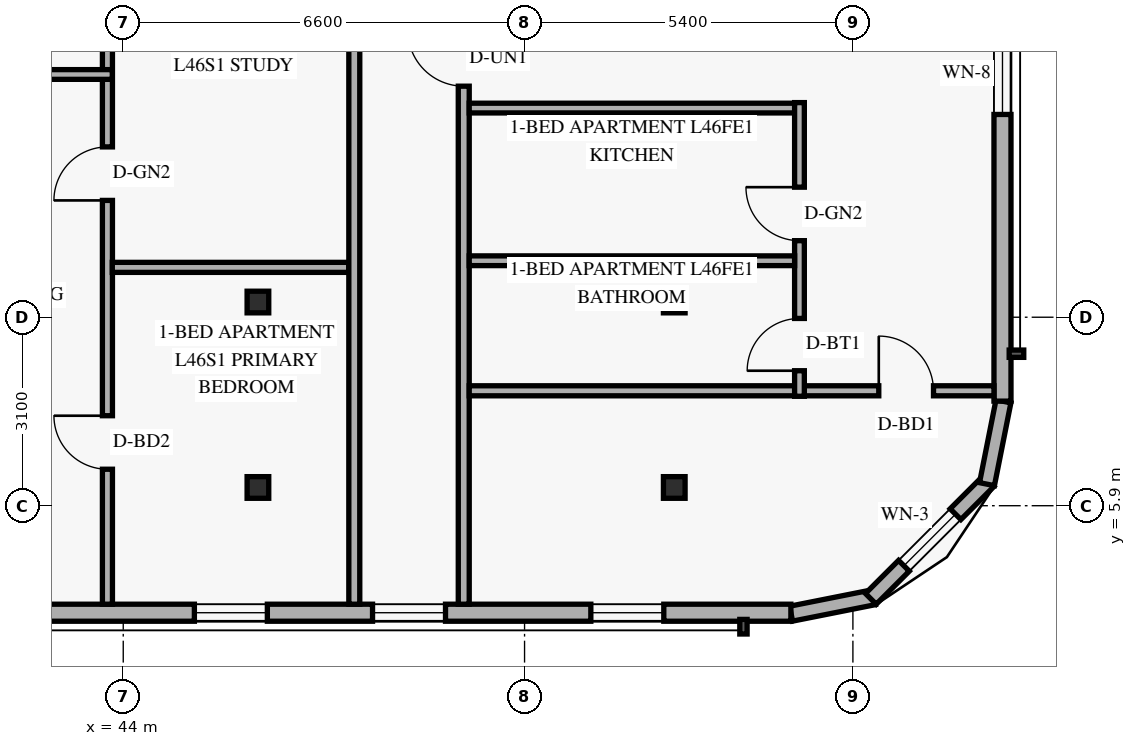
"""IFC4 building model, lengths in metres.
Left out: names, types, materials, properties, quantities, classifications, styles, units other than length and angle.
Written with IfcOpenShell. Run it as: python <this file> out.ifc"""

import sys

from ifc_helpers import new_model, si_unit, direction, frame, frame_2d, origin, origin_2d, place, context, subcontext, project, spatial, rectangle, hollow_rectangle, extrude, element, fill, save


model = new_model("IFC4")
c1 = context("Model", 3, precision=1e-05, world=origin(), true_north=direction((0.0, 1.0)))
c2 = subcontext(c1, "Body", "Model", "MODEL_VIEW")
j1 = project(units=[si_unit("LENGTHUNIT", "METRE"), si_unit("PLANEANGLEUNIT", "RADIAN")], contexts=[c1])
p1 = place(None, origin())
s1 = spatial("IfcSite", under=j1, at=p1, CompositionType="ELEMENT")
p2 = place(p1, origin())
s2 = spatial("IfcBuilding", under=s1, at=p2, CompositionType="ELEMENT")
p3 = place(p2, frame((0.0, 0.0, 177.6)))
s3 = spatial("IfcBuildingStorey", under=s2, at=p3, CompositionType="ELEMENT", Elevation=177.6)
for number, where, z_axis, x_axis in (
    (1, (46.152, 6.2, 0.0), (0.035, 0.0, 0.999), (0.0, 1.0, 0.0)),
    (2, (46.152, 9.25, 0.0), (0.035, 0.0, 0.999), (0.0, 1.0, 0.0)),
):
    element("IfcColumn", number, at=place(p3, frame(where, z_axis=z_axis, x_axis=x_axis)), inside=s3, PredefinedType="COLUMN", context=c2, shape_type="SweptSolid", body=[
        extrude(hollow_rectangle(XDim=0.356, YDim=0.356, WallThickness=0.016, at=origin_2d()), origin(), (0.0, 0.0, 1.0), 3.602),
    ])
for number, where, z_axis, x_axis in (
    (3, (52.958, 6.2, 0.0), (0.058, 0.0, 0.998), (0.0, 1.0, 0.0)),
    (4, (52.958, 9.25, 0.0), (0.058, 0.0, 0.998), (0.0, 1.0, 0.0)),
):
    element("IfcColumn", number, at=place(p3, frame(where, z_axis=z_axis, x_axis=x_axis)), inside=s3, PredefinedType="COLUMN", context=c2, shape_type="SweptSolid", body=[
        extrude(hollow_rectangle(XDim=0.356, YDim=0.356, WallThickness=0.016, at=origin_2d()), origin(), (0.0, 0.0, 1.0), 3.606),
    ])
p4 = place(p3, frame((54.983, 4.124, 0.0), z_axis=(0.0, 0.0, 1.0), x_axis=(0.980809899341, 0.19496651342, 0.0)))
e5 = element("IfcWall", 5, at=p4, inside=s3, PredefinedType="SOLIDWALL", context=c2, shape_type="SweptSolid", body=[
    extrude(rectangle(XDim=1.389, YDim=0.25, at=frame_2d((0.694, 0.0))), origin(), (0.0, 0.0, 1.0), 3.36),
])
p5 = place(p3, frame((56.295, 4.368, 0.0), z_axis=(0.0, 0.0, 1.0), x_axis=(0.707106781187, 0.707106781187, 0.0)))
e6 = element("IfcWall", 6, at=p5, inside=s3, PredefinedType="SOLIDWALL", context=c2, shape_type="SweptSolid", body=[
    extrude(rectangle(XDim=2.739, YDim=0.25, at=frame_2d((1.37, 0.0))), origin(), (0.0, 0.0, 1.0), 3.36),
])
p6 = place(p5, frame((0.77, 0.0, 0.85)))
e7 = element("IfcOpeningElement", 7, at=p6, cuts=e6, PredefinedType="OPENING", context=c2, shape_type="SweptSolid", body=[
    extrude(rectangle(XDim=1.2, YDim=1.5, at=frame_2d((0.6, 0.75))), frame((0.0, 0.135, 0.0), z_axis=(0.0, -1.0, 0.0), x_axis=(1.0, 0.0, 0.0)), (0.0, 0.0, 1.0), 0.27),
])
p7 = place(p3, frame((58.205, 6.254, 0.0), z_axis=(0.0, 0.0, 1.0), x_axis=(0.19496651342, 0.980809899341, 0.0)))
e8 = element("IfcWall", 8, at=p7, inside=s3, PredefinedType="SOLIDWALL", context=c2, shape_type="SweptSolid", body=[
    extrude(rectangle(XDim=1.389, YDim=0.25, at=frame_2d((0.694, 0.0))), origin(), (0.0, 0.0, 1.0), 3.36),
])
p8 = place(p3, frame((21.22, 4.14, 0.0), z_axis=(0.0, 0.0, 1.0), x_axis=(1.0, 0.0, 0.0)))
e9 = element("IfcWall", 9, at=p8, inside=s3, PredefinedType="SOLIDWALL", context=c2, shape_type="SweptSolid", body=[
    extrude(rectangle(XDim=33.76, YDim=0.28, at=frame_2d((16.88, 0.0))), origin(), (0.0, 0.0, 1.0), 3.36),
])
p9 = place(p8, frame((2.205, 0.0, 0.85)))
e10 = element("IfcOpeningElement", 10, at=p9, cuts=e9, PredefinedType="OPENING", context=c2, shape_type="SweptSolid", body=[
    extrude(rectangle(XDim=1.2, YDim=1.5, at=frame_2d((0.6, 0.75))), frame((0.0, 0.15, 0.0), z_axis=(0.0, -1.0, 0.0), x_axis=(1.0, 0.0, 0.0)), (0.0, 0.0, 1.0), 0.3),
])
p10 = place(p8, frame((9.09, 0.0, 0.85)))
e11 = element("IfcOpeningElement", 11, at=p10, cuts=e9, PredefinedType="OPENING", context=c2, shape_type="SweptSolid", body=[
    extrude(rectangle(XDim=1.2, YDim=1.5, at=frame_2d((0.6, 0.75))), frame((0.0, 0.15, 0.0), z_axis=(0.0, -1.0, 0.0), x_axis=(1.0, 0.0, 0.0)), (0.0, 0.0, 1.0), 0.3),
])
p11 = place(p8, frame((14.665, 0.0, 0.85)))
e12 = element("IfcOpeningElement", 12, at=p11, cuts=e9, PredefinedType="OPENING", context=c2, shape_type="SweptSolid", body=[
    extrude(rectangle(XDim=1.2, YDim=1.5, at=frame_2d((0.6, 0.75))), frame((0.0, 0.15, 0.0), z_axis=(0.0, -1.0, 0.0), x_axis=(1.0, 0.0, 0.0)), (0.0, 0.0, 1.0), 0.3),
])
p12 = place(p8, frame((18.825, 0.0, 0.85)))
e13 = element("IfcOpeningElement", 13, at=p12, cuts=e9, PredefinedType="OPENING", context=c2, shape_type="SweptSolid", body=[
    extrude(rectangle(XDim=1.2, YDim=1.5, at=frame_2d((0.6, 0.75))), frame((0.0, 0.15, 0.0), z_axis=(0.0, -1.0, 0.0), x_axis=(1.0, 0.0, 0.0)), (0.0, 0.0, 1.0), 0.3),
])
p13 = place(p8, frame((23.95, 0.0, 0.85)))
e14 = element("IfcOpeningElement", 14, at=p13, cuts=e9, PredefinedType="OPENING", context=c2, shape_type="SweptSolid", body=[
    extrude(rectangle(XDim=1.2, YDim=1.5, at=frame_2d((0.6, 0.75))), frame((0.0, 0.15, 0.0), z_axis=(0.0, -1.0, 0.0), x_axis=(1.0, 0.0, 0.0)), (0.0, 0.0, 1.0), 0.3),
])
p14 = place(p8, frame((26.88, 0.0, 0.85)))
e15 = element("IfcOpeningElement", 15, at=p14, cuts=e9, PredefinedType="OPENING", context=c2, shape_type="SweptSolid", body=[
    extrude(rectangle(XDim=1.2, YDim=1.5, at=frame_2d((0.6, 0.75))), frame((0.0, 0.15, 0.0), z_axis=(0.0, -1.0, 0.0), x_axis=(1.0, 0.0, 0.0)), (0.0, 0.0, 1.0), 0.3),
])
p15 = place(p8, frame((30.47, 0.0, 0.85)))
e16 = element("IfcOpeningElement", 16, at=p15, cuts=e9, PredefinedType="OPENING", context=c2, shape_type="SweptSolid", body=[
    extrude(rectangle(XDim=1.2, YDim=1.5, at=frame_2d((0.6, 0.75))), frame((0.0, 0.15, 0.0), z_axis=(0.0, -1.0, 0.0), x_axis=(1.0, 0.0, 0.0)), (0.0, 0.0, 1.0), 0.3),
])
p16 = place(p3, frame((58.46, 7.62, 0.0), z_axis=(0.0, 0.0, 1.0), x_axis=(0.0, 1.0, 0.0)))
e17 = element("IfcWall", 17, at=p16, inside=s3, PredefinedType="SOLIDWALL", context=c2, shape_type="SweptSolid", body=[
    extrude(rectangle(XDim=32.76, YDim=0.28, at=frame_2d((16.38, 0.0))), origin(), (0.0, 0.0, 1.0), 3.36),
])
p17 = place(p16, frame((4.715, 0.0, 0.85)))
e18 = element("IfcOpeningElement", 18, at=p17, cuts=e17, PredefinedType="OPENING", context=c2, shape_type="SweptSolid", body=[
    extrude(rectangle(XDim=1.35, YDim=1.55, at=frame_2d((0.675, 0.775))), frame((0.0, 0.15, 0.0), z_axis=(0.0, -1.0, 0.0), x_axis=(1.0, 0.0, 0.0)), (0.0, 0.0, 1.0), 0.3),
])
p18 = place(p16, frame((11.35, 0.0, 0.85)))
e19 = element("IfcOpeningElement", 19, at=p18, cuts=e17, PredefinedType="OPENING", context=c2, shape_type="SweptSolid", body=[
    extrude(rectangle(XDim=1.35, YDim=1.55, at=frame_2d((0.675, 0.775))), frame((0.0, 0.15, 0.0), z_axis=(0.0, -1.0, 0.0), x_axis=(1.0, 0.0, 0.0)), (0.0, 0.0, 1.0), 0.3),
])
p19 = place(p16, frame((16.305, 0.0, 0.85)))
e20 = element("IfcOpeningElement", 20, at=p19, cuts=e17, PredefinedType="OPENING", context=c2, shape_type="SweptSolid", body=[
    extrude(rectangle(XDim=1.35, YDim=1.55, at=frame_2d((0.675, 0.775))), frame((0.0, 0.15, 0.0), z_axis=(0.0, -1.0, 0.0), x_axis=(1.0, 0.0, 0.0)), (0.0, 0.0, 1.0), 0.3),
])
p20 = place(p16, frame((22.06, 0.0, 0.85)))
e21 = element("IfcOpeningElement", 21, at=p20, cuts=e17, PredefinedType="OPENING", context=c2, shape_type="SweptSolid", body=[
    extrude(rectangle(XDim=1.35, YDim=1.55, at=frame_2d((0.675, 0.775))), frame((0.0, 0.15, 0.0), z_axis=(0.0, -1.0, 0.0), x_axis=(1.0, 0.0, 0.0)), (0.0, 0.0, 1.0), 0.3),
])
p21 = place(p16, frame((27.05, 0.0, 0.85)))
e22 = element("IfcOpeningElement", 22, at=p21, cuts=e17, PredefinedType="OPENING", context=c2, shape_type="SweptSolid", body=[
    extrude(rectangle(XDim=1.35, YDim=1.55, at=frame_2d((0.675, 0.775))), frame((0.0, 0.15, 0.0), z_axis=(0.0, -1.0, 0.0), x_axis=(1.0, 0.0, 0.0)), (0.0, 0.0, 1.0), 0.3),
])
p22 = place(p16, frame((31.04, 0.0, 0.85)))
e23 = element("IfcOpeningElement", 23, at=p22, cuts=e17, PredefinedType="OPENING", context=c2, shape_type="SweptSolid", body=[
    extrude(rectangle(XDim=1.35, YDim=1.55, at=frame_2d((0.675, 0.775))), frame((0.0, 0.15, 0.0), z_axis=(0.0, -1.0, 0.0), x_axis=(1.0, 0.0, 0.0)), (0.0, 0.0, 1.0), 0.3),
])
p23 = place(p3, frame((43.74, 4.28, 0.0), z_axis=(0.0, 0.0, 1.0), x_axis=(0.0, 1.0, 0.0)))
e24 = element("IfcWall", 24, at=p23, inside=s3, PredefinedType="PARTITIONING", context=c2, shape_type="SweptSolid", body=[
    extrude(rectangle(XDim=11.21, YDim=0.165, at=frame_2d((5.605, 0.0))), origin(), (0.0, 0.0, 1.0), 2.73),
])
p24 = place(p23, frame((2.22, 0.0, 0.0)))
e25 = element("IfcOpeningElement", 25, at=p24, cuts=e24, PredefinedType="OPENING", context=c2, shape_type="SweptSolid", body=[
    extrude(rectangle(XDim=0.88, YDim=2.14, at=frame_2d((0.44, 1.07))), frame((0.0, 0.093, 0.0), z_axis=(0.0, -1.0, 0.0), x_axis=(1.0, 0.0, 0.0)), (0.0, 0.0, 1.0), 0.185),
])
p25 = place(p23, frame((6.641, 0.0, 0.0)))
e26 = element("IfcOpeningElement", 26, at=p25, cuts=e24, PredefinedType="OPENING", context=c2, shape_type="SweptSolid", body=[
    extrude(rectangle(XDim=0.88, YDim=2.12, at=frame_2d((0.44, 1.06))), frame((0.0, 0.093, 0.0), z_axis=(0.0, -1.0, 0.0), x_axis=(1.0, 0.0, 0.0)), (0.0, 0.0, 1.0), 0.185),
])
p26 = place(p3, frame((39.11, 12.992, 0.0), z_axis=(0.0, 0.0, 1.0), x_axis=(1.0, 0.0, 0.0)))
e27 = element("IfcWall", 27, at=p26, inside=s3, PredefinedType="PLUMBINGWALL", context=c2, shape_type="SweptSolid", body=[
    extrude(rectangle(XDim=4.71, YDim=0.16, at=frame_2d((2.355, 0.0))), origin(), (0.0, 0.0, 1.0), 3.36),
])
p27 = place(p26, frame((0.38, 0.0, 0.0)))
e28 = element("IfcOpeningElement", 28, at=p27, cuts=e27, PredefinedType="OPENING", context=c2, shape_type="SweptSolid", body=[
    extrude(rectangle(XDim=0.88, YDim=2.12, at=frame_2d((0.44, 1.06))), frame((0.0, 0.09, 0.0), z_axis=(0.0, -1.0, 0.0), x_axis=(1.0, 0.0, 0.0)), (0.0, 0.0, 1.0), 0.18),
])
p28 = place(p26, frame((2.786, 0.0, 0.0)))
e29 = element("IfcOpeningElement", 29, at=p28, cuts=e27, PredefinedType="OPENING", context=c2, shape_type="SweptSolid", body=[
    extrude(rectangle(XDim=0.86, YDim=2.12, at=frame_2d((0.43, 1.06))), frame((0.0, 0.09, 0.0), z_axis=(0.0, -1.0, 0.0), x_axis=(1.0, 0.0, 0.0)), (0.0, 0.0, 1.0), 0.18),
])
p29 = place(p3, frame((43.82, 9.82, 0.0), z_axis=(0.0, 0.0, 1.0), x_axis=(1.0, 0.0, 0.0)))
e30 = element("IfcWall", 30, at=p29, inside=s3, PredefinedType="PARTITIONING", context=c2, shape_type="SweptSolid", body=[
    extrude(rectangle(XDim=3.89, YDim=0.165, at=frame_2d((1.945, 0.0))), origin(), (0.0, 0.0, 1.0), 2.73),
])
p30 = place(p3, frame((49.6, 4.28, 0.0), z_axis=(0.0, 0.0, 1.0), x_axis=(0.0, 1.0, 0.0)))
e31 = element("IfcWall", 31, at=p30, inside=s3, PredefinedType="STANDARD", context=c2, shape_type="SweptSolid", body=[
    extrude(rectangle(XDim=39.44, YDim=0.18, at=frame_2d((19.72, 0.0))), origin(), (0.0, 0.0, 1.0), 2.73),
])
p31 = place(p30, frame((8.52, 0.0, 0.0)))
e32 = element("IfcOpeningElement", 32, at=p31, cuts=e31, PredefinedType="OPENING", context=c2, shape_type="SweptSolid", body=[
    extrude(rectangle(XDim=0.92, YDim=2.15, at=frame_2d((0.46, 1.075))), frame((0.0, 0.1, 0.0), z_axis=(0.0, -1.0, 0.0), x_axis=(1.0, 0.0, 0.0)), (0.0, 0.0, 1.0), 0.2),
])
p32 = place(p30, frame((18.052, 0.0, 0.0)))
e33 = element("IfcOpeningElement", 33, at=p32, cuts=e31, PredefinedType="OPENING", context=c2, shape_type="SweptSolid", body=[
    extrude(rectangle(XDim=0.92, YDim=2.15, at=frame_2d((0.46, 1.075))), frame((0.0, 0.1, 0.0), z_axis=(0.0, -1.0, 0.0), x_axis=(1.0, 0.0, 0.0)), (0.0, 0.0, 1.0), 0.2),
])
p33 = place(p30, frame((33.12, 0.0, 0.0)))
e34 = element("IfcOpeningElement", 34, at=p33, cuts=e31, PredefinedType="OPENING", context=c2, shape_type="SweptSolid", body=[
    extrude(rectangle(XDim=0.92, YDim=2.15, at=frame_2d((0.46, 1.075))), frame((0.0, 0.1, 0.0), z_axis=(0.0, -1.0, 0.0), x_axis=(1.0, 0.0, 0.0)), (0.0, 0.0, 1.0), 0.2),
])
p34 = place(p3, frame((47.8, 4.28, 0.0), z_axis=(0.0, 0.0, 1.0), x_axis=(0.0, 1.0, 0.0)))
e35 = element("IfcWall", 35, at=p34, inside=s3, PredefinedType="STANDARD", context=c2, shape_type="SweptSolid", body=[
    extrude(rectangle(XDim=11.21, YDim=0.18, at=frame_2d((5.605, 0.0))), origin(), (0.0, 0.0, 1.0), 2.73),
])
p35 = place(p3, frame((49.69, 7.79, 0.0), z_axis=(0.0, 0.0, 1.0), x_axis=(1.0, 0.0, 0.0)))
e36 = element("IfcWall", 36, at=p35, inside=s3, PredefinedType="PARTITIONING", context=c2, shape_type="SweptSolid", body=[
    extrude(rectangle(XDim=8.63, YDim=0.165, at=frame_2d((4.315, 0.0))), origin(), (0.0, 0.0, 1.0), 2.879),
])
p36 = place(p35, frame((6.736, 0.0, 0.0)))
e37 = element("IfcOpeningElement", 37, at=p36, cuts=e36, PredefinedType="OPENING", context=c2, shape_type="SweptSolid", body=[
    extrude(rectangle(XDim=0.9, YDim=2.14, at=frame_2d((0.45, 1.07))), frame((0.0, 0.093, 0.0), z_axis=(0.0, -1.0, 0.0), x_axis=(1.0, 0.0, 0.0)), (0.0, 0.0, 1.0), 0.185),
])
p37 = place(p3, frame((49.69, 12.44, 0.0), z_axis=(0.0, 0.0, 1.0), x_axis=(1.0, 0.0, 0.0)))
e38 = element("IfcWall", 38, at=p37, inside=s3, PredefinedType="PLUMBINGWALL", context=c2, shape_type="SweptSolid", body=[
    extrude(rectangle(XDim=5.511, YDim=0.16, at=frame_2d((2.756, 0.0))), origin(), (0.0, 0.0, 1.0), 2.879),
])
p38 = place(p3, frame((55.121, 7.7, 0.0), z_axis=(0.0, 0.0, 1.0), x_axis=(0.0, 1.0, 0.0)))
e39 = element("IfcWall", 39, at=p38, inside=s3, PredefinedType="PLUMBINGWALL", context=c2, shape_type="SweptSolid", body=[
    extrude(rectangle(XDim=4.83, YDim=0.16, at=frame_2d((2.415, 0.0))), origin(), (0.0, 0.0, 1.0), 3.36),
])
p39 = place(p38, frame((0.42, 0.0, 0.0)))
e40 = element("IfcOpeningElement", 40, at=p39, cuts=e39, PredefinedType="OPENING", context=c2, shape_type="SweptSolid", body=[
    extrude(rectangle(XDim=0.86, YDim=2.12, at=frame_2d((0.43, 1.06))), frame((0.0, 0.09, 0.0), z_axis=(0.0, -1.0, 0.0), x_axis=(1.0, 0.0, 0.0)), (0.0, 0.0, 1.0), 0.18),
])
p40 = place(p38, frame((2.559, 0.0, 0.0)))
e41 = element("IfcOpeningElement", 41, at=p40, cuts=e39, PredefinedType="OPENING", context=c2, shape_type="SweptSolid", body=[
    extrude(rectangle(XDim=0.88, YDim=2.12, at=frame_2d((0.44, 1.06))), frame((0.0, 0.09, 0.0), z_axis=(0.0, -1.0, 0.0), x_axis=(1.0, 0.0, 0.0)), (0.0, 0.0, 1.0), 0.18),
])
p41 = place(p3, frame((49.69, 9.929, 0.0), z_axis=(0.0, 0.0, 1.0), x_axis=(1.0, 0.0, 0.0)))
e42 = element("IfcWall", 42, at=p41, inside=s3, PredefinedType="PLUMBINGWALL", context=c2, shape_type="SweptSolid", body=[
    extrude(rectangle(XDim=5.351, YDim=0.16, at=frame_2d((2.676, 0.0))), origin(), (0.0, 0.0, 1.0), 2.879),
])
p42 = place(p6, origin())
e43 = element("IfcWindow", 43, at=p42, inside=s3, PartitioningType="SINGLE_PANEL", PredefinedType="WINDOW", context=c2, shape_type="SweptSolid", body=[
    extrude(rectangle(XDim=1.2, YDim=1.5, at=frame_2d((0.6, 0.75))), frame((0.0, 0.03, 0.0), z_axis=(0.0, -1.0, 0.0), x_axis=(1.0, 0.0, 0.0)), (0.0, 0.0, 1.0), 0.06),
])
fill(e7, e43)
p43 = place(p13, origin())
e44 = element("IfcWindow", 44, at=p43, inside=s3, PartitioningType="SINGLE_PANEL", PredefinedType="WINDOW", context=c2, shape_type="SweptSolid", body=[
    extrude(rectangle(XDim=1.2, YDim=1.5, at=frame_2d((0.6, 0.75))), frame((0.0, 0.03, 0.0), z_axis=(0.0, -1.0, 0.0), x_axis=(1.0, 0.0, 0.0)), (0.0, 0.0, 1.0), 0.06),
])
fill(e14, e44)
p44 = place(p14, origin())
e45 = element("IfcWindow", 45, at=p44, inside=s3, PartitioningType="SINGLE_PANEL", PredefinedType="WINDOW", context=c2, shape_type="SweptSolid", body=[
    extrude(rectangle(XDim=1.2, YDim=1.5, at=frame_2d((0.6, 0.75))), frame((0.0, 0.03, 0.0), z_axis=(0.0, -1.0, 0.0), x_axis=(1.0, 0.0, 0.0)), (0.0, 0.0, 1.0), 0.06),
])
fill(e15, e45)
p45 = place(p15, origin())
e46 = element("IfcWindow", 46, at=p45, inside=s3, PartitioningType="SINGLE_PANEL", PredefinedType="WINDOW", context=c2, shape_type="SweptSolid", body=[
    extrude(rectangle(XDim=1.2, YDim=1.5, at=frame_2d((0.6, 0.75))), frame((0.0, 0.03, 0.0), z_axis=(0.0, -1.0, 0.0), x_axis=(1.0, 0.0, 0.0)), (0.0, 0.0, 1.0), 0.06),
])
fill(e16, e46)
p46 = place(p17, origin())
e47 = element("IfcWindow", 47, at=p46, inside=s3, PartitioningType="SINGLE_PANEL", PredefinedType="WINDOW", context=c2, shape_type="SweptSolid", body=[
    extrude(rectangle(XDim=1.35, YDim=1.55, at=frame_2d((0.675, 0.775))), frame((0.0, 0.03, 0.0), z_axis=(0.0, -1.0, 0.0), x_axis=(1.0, 0.0, 0.0)), (0.0, 0.0, 1.0), 0.06),
])
fill(e18, e47)
p47 = place(p24, origin())
e48 = element("IfcDoor", 48, at=p47, inside=s3, OperationType="SINGLE_SWING_RIGHT", PredefinedType="DOOR", context=c2, shape_type="SweptSolid", body=[
    extrude(rectangle(XDim=0.88, YDim=2.14, at=frame_2d((0.44, 1.07))), frame((0.0, 0.025, 0.0), z_axis=(0.0, -1.0, 0.0), x_axis=(1.0, 0.0, 0.0)), (0.0, 0.0, 1.0), 0.05),
])
fill(e25, e48)
p48 = place(p25, origin())
e49 = element("IfcDoor", 49, at=p48, inside=s3, OperationType="SINGLE_SWING_LEFT", PredefinedType="DOOR", context=c2, shape_type="SweptSolid", body=[
    extrude(rectangle(XDim=0.88, YDim=2.12, at=frame_2d((0.44, 1.06))), frame((0.0, 0.025, 0.0), z_axis=(0.0, -1.0, 0.0), x_axis=(1.0, 0.0, 0.0)), (0.0, 0.0, 1.0), 0.05),
])
fill(e26, e49)
p49 = place(p31, origin())
e50 = element("IfcDoor", 50, at=p49, inside=s3, OperationType="SINGLE_SWING_RIGHT", PredefinedType="DOOR", context=c2, shape_type="SweptSolid", body=[
    extrude(rectangle(XDim=0.92, YDim=2.15, at=frame_2d((0.46, 1.075))), frame((0.0, 0.025, 0.0), z_axis=(0.0, -1.0, 0.0), x_axis=(1.0, 0.0, 0.0)), (0.0, 0.0, 1.0), 0.05),
])
fill(e32, e50)
p50 = place(p39, origin())
e51 = element("IfcDoor", 51, at=p50, inside=s3, OperationType="SINGLE_SWING_LEFT", PredefinedType="DOOR", context=c2, shape_type="SweptSolid", body=[
    extrude(rectangle(XDim=0.86, YDim=2.12, at=frame_2d((0.43, 1.06))), frame((0.0, 0.025, 0.0), z_axis=(0.0, -1.0, 0.0), x_axis=(1.0, 0.0, 0.0)), (0.0, 0.0, 1.0), 0.05),
])
fill(e40, e51)
p51 = place(p40, origin())
e52 = element("IfcDoor", 52, at=p51, inside=s3, OperationType="SINGLE_SWING_RIGHT", PredefinedType="DOOR", context=c2, shape_type="SweptSolid", body=[
    extrude(rectangle(XDim=0.88, YDim=2.12, at=frame_2d((0.44, 1.06))), frame((0.0, 0.025, 0.0), z_axis=(0.0, -1.0, 0.0), x_axis=(1.0, 0.0, 0.0)), (0.0, 0.0, 1.0), 0.05),
])
fill(e41, e52)
p52 = place(p36, origin())
e53 = element("IfcDoor", 53, at=p52, inside=s3, OperationType="SINGLE_SWING_LEFT", PredefinedType="DOOR", context=c2, shape_type="SweptSolid", body=[
    extrude(rectangle(XDim=0.9, YDim=2.14, at=frame_2d((0.45, 1.07))), frame((0.0, 0.025, 0.0), z_axis=(0.0, -1.0, 0.0), x_axis=(1.0, 0.0, 0.0)), (0.0, 0.0, 1.0), 0.05),
])
fill(e37, e53)
save(model, sys.argv[1])
